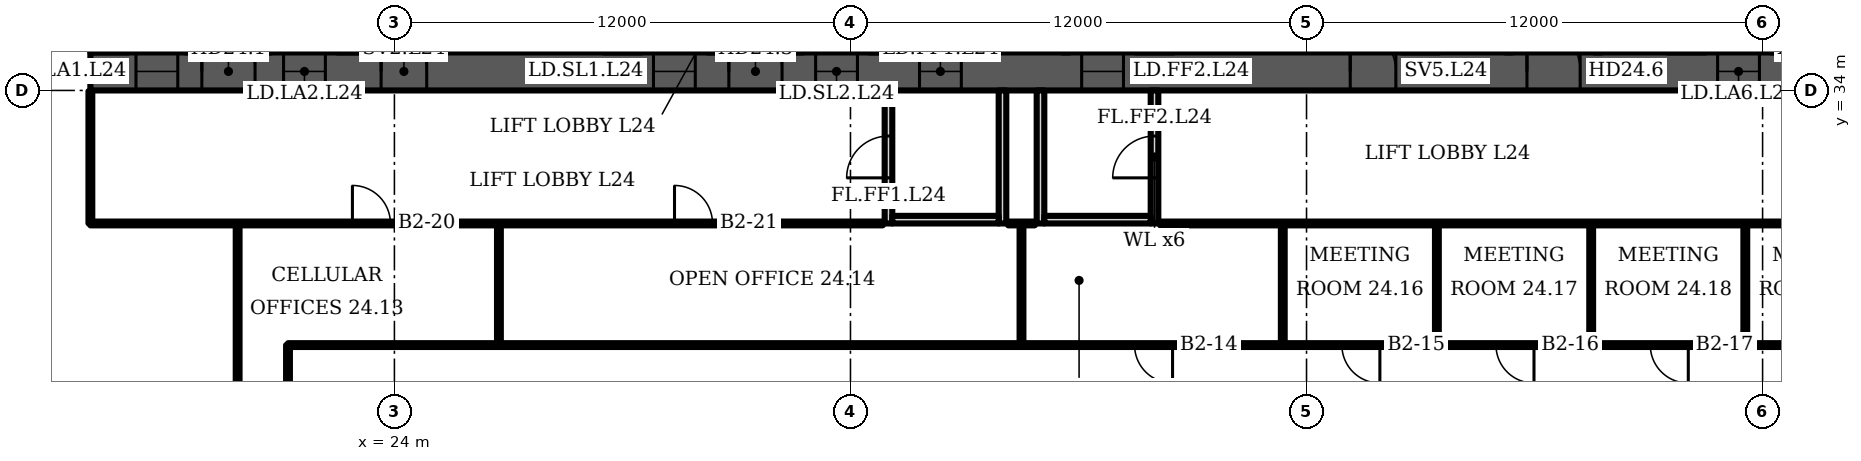
"""IFC4 building model, lengths in metres.
Left out: names, types, materials, properties, quantities, classifications, styles, units other than length and angle.
Written with IfcOpenShell. Run it as: python <this file> out.ifc"""

import sys

from ifc_helpers import new_model, si_unit, direction, frame, frame_2d, origin, place, context, subcontext, project, spatial, rectangle, extrude, element, fill, save


model = new_model("IFC4")
c1 = context("Model", 3, precision=1e-05, world=origin(), true_north=direction((0.0, 1.0)))
c2 = subcontext(c1, "Body", "Model", "MODEL_VIEW")
j1 = project(units=[si_unit("LENGTHUNIT", "METRE"), si_unit("PLANEANGLEUNIT", "RADIAN")], contexts=[c1])
p1 = place(None, origin())
s1 = spatial("IfcSite", under=j1, at=p1, CompositionType="ELEMENT")
p2 = place(p1, origin())
s2 = spatial("IfcBuilding", under=s1, at=p2, CompositionType="ELEMENT")
p3 = place(p2, frame((0.0, 0.0, 107.5)))
s3 = spatial("IfcBuildingStorey", under=s2, at=p3, CompositionType="ELEMENT", Elevation=107.5)
p4 = place(p3, frame((16.0, 34.5, 0.0), z_axis=(0.0, 0.0, 1.0), x_axis=(1.0, 0.0, 0.0)))
e1 = element("IfcWall", 1, at=p4, inside=s3, PredefinedType="SHEAR", context=c2, shape_type="SweptSolid", body=[
    extrude(rectangle(XDim=49.0, YDim=1.0, at=frame_2d((24.5, 0.0))), origin(), (0.0, 0.0, 1.0), 3.6),
])
p5 = place(p4, frame((1.2, 0.0, 0.0)))
e2 = element("IfcOpeningElement", 2, at=p5, cuts=e1, PredefinedType="OPENING", context=c2, shape_type="SweptSolid", body=[
    extrude(rectangle(XDim=1.1, YDim=2.1, at=frame_2d((0.55, 1.05))), frame((0.0, 0.51, 0.0), z_axis=(0.0, -1.0, 0.0), x_axis=(1.0, 0.0, 0.0)), (0.0, 0.0, 1.0), 1.02),
])
p6 = place(p4, frame((5.083, 0.0, 0.0)))
e3 = element("IfcOpeningElement", 3, at=p6, cuts=e1, PredefinedType="OPENING", context=c2, shape_type="SweptSolid", body=[
    extrude(rectangle(XDim=1.1, YDim=2.1, at=frame_2d((0.55, 1.05))), frame((0.0, 0.51, 0.0), z_axis=(0.0, -1.0, 0.0), x_axis=(1.0, 0.0, 0.0)), (0.0, 0.0, 1.0), 1.02),
])
p7 = place(p4, frame((2.933, 0.0, 0.0)))
e4 = element("IfcOpeningElement", 4, at=p7, cuts=e1, PredefinedType="OPENING", context=c2, shape_type="SweptSolid", body=[
    extrude(rectangle(XDim=1.4, YDim=2.1, at=frame_2d((0.7, 1.05))), frame((0.0, 0.51, 0.0), z_axis=(0.0, -1.0, 0.0), x_axis=(1.0, 0.0, 0.0)), (0.0, 0.0, 1.0), 1.02),
])
p8 = place(p4, frame((7.65, 0.0, 0.0)))
e5 = element("IfcOpeningElement", 5, at=p8, cuts=e1, PredefinedType="OPENING", context=c2, shape_type="SweptSolid", body=[
    extrude(rectangle(XDim=1.2, YDim=2.1, at=frame_2d((0.6, 1.05))), frame((0.0, 0.51, 0.0), z_axis=(0.0, -1.0, 0.0), x_axis=(1.0, 0.0, 0.0)), (0.0, 0.0, 1.0), 1.02),
])
p9 = place(p4, frame((14.817, 0.0, 0.0)))
e6 = element("IfcOpeningElement", 6, at=p9, cuts=e1, PredefinedType="OPENING", context=c2, shape_type="SweptSolid", body=[
    extrude(rectangle(XDim=1.1, YDim=2.1, at=frame_2d((0.55, 1.05))), frame((0.0, 0.51, 0.0), z_axis=(0.0, -1.0, 0.0), x_axis=(1.0, 0.0, 0.0)), (0.0, 0.0, 1.0), 1.02),
])
p10 = place(p4, frame((19.083, 0.0, 0.0)))
e7 = element("IfcOpeningElement", 7, at=p10, cuts=e1, PredefinedType="OPENING", context=c2, shape_type="SweptSolid", body=[
    extrude(rectangle(XDim=1.1, YDim=2.1, at=frame_2d((0.55, 1.05))), frame((0.0, 0.51, 0.0), z_axis=(0.0, -1.0, 0.0), x_axis=(1.0, 0.0, 0.0)), (0.0, 0.0, 1.0), 1.02),
])
p11 = place(p4, frame((16.8, 0.0, 0.0)))
e8 = element("IfcOpeningElement", 8, at=p11, cuts=e1, PredefinedType="OPENING", context=c2, shape_type="SweptSolid", body=[
    extrude(rectangle(XDim=1.4, YDim=2.1, at=frame_2d((0.7, 1.05))), frame((0.0, 0.51, 0.0), z_axis=(0.0, -1.0, 0.0), x_axis=(1.0, 0.0, 0.0)), (0.0, 0.0, 1.0), 1.02),
])
p12 = place(p4, frame((21.817, 0.0, 0.0)))
e9 = element("IfcOpeningElement", 9, at=p12, cuts=e1, PredefinedType="OPENING", context=c2, shape_type="SweptSolid", body=[
    extrude(rectangle(XDim=1.1, YDim=2.1, at=frame_2d((0.55, 1.05))), frame((0.0, 0.51, 0.0), z_axis=(0.0, -1.0, 0.0), x_axis=(1.0, 0.0, 0.0)), (0.0, 0.0, 1.0), 1.02),
])
p13 = place(p4, frame((26.083, 0.0, 0.0)))
e10 = element("IfcOpeningElement", 10, at=p13, cuts=e1, PredefinedType="OPENING", context=c2, shape_type="SweptSolid", body=[
    extrude(rectangle(XDim=1.1, YDim=2.1, at=frame_2d((0.55, 1.05))), frame((0.0, 0.51, 0.0), z_axis=(0.0, -1.0, 0.0), x_axis=(1.0, 0.0, 0.0)), (0.0, 0.0, 1.0), 1.02),
])
p14 = place(p4, frame((33.15, 0.0, 0.0)))
e11 = element("IfcOpeningElement", 11, at=p14, cuts=e1, PredefinedType="OPENING", context=c2, shape_type="SweptSolid", body=[
    extrude(rectangle(XDim=1.2, YDim=2.1, at=frame_2d((0.6, 1.05))), frame((0.0, 0.51, 0.0), z_axis=(0.0, -1.0, 0.0), x_axis=(1.0, 0.0, 0.0)), (0.0, 0.0, 1.0), 1.02),
])
p15 = place(p4, frame((37.8, 0.0, 0.0)))
e12 = element("IfcOpeningElement", 12, at=p15, cuts=e1, PredefinedType="OPENING", context=c2, shape_type="SweptSolid", body=[
    extrude(rectangle(XDim=1.4, YDim=2.1, at=frame_2d((0.7, 1.05))), frame((0.0, 0.51, 0.0), z_axis=(0.0, -1.0, 0.0), x_axis=(1.0, 0.0, 0.0)), (0.0, 0.0, 1.0), 1.02),
])
p16 = place(p4, frame((42.817, 0.0, 0.0)))
e13 = element("IfcOpeningElement", 13, at=p16, cuts=e1, PredefinedType="OPENING", context=c2, shape_type="SweptSolid", body=[
    extrude(rectangle(XDim=1.1, YDim=2.1, at=frame_2d((0.55, 1.05))), frame((0.0, 0.51, 0.0), z_axis=(0.0, -1.0, 0.0), x_axis=(1.0, 0.0, 0.0)), (0.0, 0.0, 1.0), 1.02),
])
p17 = place(p4, frame((46.7, 0.0, 0.0)))
e14 = element("IfcOpeningElement", 14, at=p17, cuts=e1, PredefinedType="OPENING", context=c2, shape_type="SweptSolid", body=[
    extrude(rectangle(XDim=1.1, YDim=2.1, at=frame_2d((0.55, 1.05))), frame((0.0, 0.51, 0.0), z_axis=(0.0, -1.0, 0.0), x_axis=(1.0, 0.0, 0.0)), (0.0, 0.0, 1.0), 1.02),
])
p18 = place(p4, frame((44.667, 0.0, 0.0)))
e15 = element("IfcOpeningElement", 15, at=p18, cuts=e1, PredefinedType="OPENING", context=c2, shape_type="SweptSolid", body=[
    extrude(rectangle(XDim=1.4, YDim=2.1, at=frame_2d((0.7, 1.05))), frame((0.0, 0.51, 0.0), z_axis=(0.0, -1.0, 0.0), x_axis=(1.0, 0.0, 0.0)), (0.0, 0.0, 1.0), 1.02),
])
p19 = place(p3, frame((37.0, 30.5, 0.0), z_axis=(0.0, 0.0, 1.0), x_axis=(0.0, 1.0, 0.0)))
e16 = element("IfcWall", 16, at=p19, inside=s3, PredefinedType="PARTITIONING", context=c2, shape_type="SweptSolid", body=[
    extrude(rectangle(XDim=3.5, YDim=0.2, at=frame_2d((1.75, 0.0))), origin(), (0.0, 0.0, 1.0), 3.2),
])
p20 = place(p19, frame((1.2, 0.0, 0.0)))
e17 = element("IfcOpeningElement", 17, at=p20, cuts=e16, PredefinedType="OPENING", context=c2, shape_type="SweptSolid", body=[
    extrude(rectangle(XDim=1.1, YDim=2.1, at=frame_2d((0.55, 1.05))), frame((0.0, 0.11, 0.0), z_axis=(0.0, -1.0, 0.0), x_axis=(1.0, 0.0, 0.0)), (0.0, 0.0, 1.0), 0.22),
])
p21 = place(p3, frame((40.0, 30.5, 0.0), z_axis=(0.0, 0.0, 1.0), x_axis=(0.0, 1.0, 0.0)))
e18 = element("IfcWall", 18, at=p21, inside=s3, PredefinedType="PARTITIONING", context=c2, shape_type="SweptSolid", body=[
    extrude(rectangle(XDim=3.5, YDim=0.2, at=frame_2d((1.75, 0.0))), origin(), (0.0, 0.0, 1.0), 3.2),
])
p22 = place(p3, frame((37.1, 30.6, 0.0), z_axis=(0.0, 0.0, 1.0), x_axis=(1.0, 0.0, 0.0)))
e19 = element("IfcWall", 19, at=p22, inside=s3, PredefinedType="PARTITIONING", context=c2, shape_type="SweptSolid", body=[
    extrude(rectangle(XDim=2.8, YDim=0.2, at=frame_2d((1.4, 0.0))), origin(), (0.0, 0.0, 1.0), 3.2),
])
p23 = place(p3, frame((41.0, 30.5, 0.0), z_axis=(0.0, 0.0, 1.0), x_axis=(0.0, 1.0, 0.0)))
e20 = element("IfcWall", 20, at=p23, inside=s3, PredefinedType="PARTITIONING", context=c2, shape_type="SweptSolid", body=[
    extrude(rectangle(XDim=3.5, YDim=0.2, at=frame_2d((1.75, 0.0))), origin(), (0.0, 0.0, 1.0), 3.2),
])
p24 = place(p3, frame((44.0, 30.5, 0.0), z_axis=(0.0, 0.0, 1.0), x_axis=(0.0, 1.0, 0.0)))
e21 = element("IfcWall", 21, at=p24, inside=s3, PredefinedType="PARTITIONING", context=c2, shape_type="SweptSolid", body=[
    extrude(rectangle(XDim=3.5, YDim=0.2, at=frame_2d((1.75, 0.0))), origin(), (0.0, 0.0, 1.0), 3.2),
])
p25 = place(p24, frame((1.2, 0.0, 0.0)))
e22 = element("IfcOpeningElement", 22, at=p25, cuts=e21, PredefinedType="OPENING", context=c2, shape_type="SweptSolid", body=[
    extrude(rectangle(XDim=1.1, YDim=2.1, at=frame_2d((0.55, 1.05))), frame((0.0, 0.11, 0.0), z_axis=(0.0, -1.0, 0.0), x_axis=(1.0, 0.0, 0.0)), (0.0, 0.0, 1.0), 0.22),
])
p26 = place(p3, frame((41.1, 30.6, 0.0), z_axis=(0.0, 0.0, 1.0), x_axis=(1.0, 0.0, 0.0)))
e23 = element("IfcWall", 23, at=p26, inside=s3, PredefinedType="PARTITIONING", context=c2, shape_type="SweptSolid", body=[
    extrude(rectangle(XDim=2.8, YDim=0.2, at=frame_2d((1.4, 0.0))), origin(), (0.0, 0.0, 1.0), 3.2),
])
p27 = place(p3, frame((16.0, 30.5, 0.0), z_axis=(0.0, 0.0, 1.0), x_axis=(0.0, 1.0, 0.0)))
e24 = element("IfcWall", 24, at=p27, inside=s3, PredefinedType="PARTITIONING", context=c2, shape_type="SweptSolid", body=[
    extrude(rectangle(XDim=3.48, YDim=0.1, at=frame_2d((1.74, 0.0))), origin(), (0.0, 0.0, 1.0), 3.2),
])
p28 = place(p3, frame((16.0, 30.5, 0.0), z_axis=(0.0, 0.0, 1.0), x_axis=(1.0, 0.0, 0.0)))
e25 = element("IfcWall", 25, at=p28, inside=s3, PredefinedType="PARTITIONING", context=c2, shape_type="SweptSolid", body=[
    extrude(rectangle(XDim=20.85, YDim=0.1, at=frame_2d((10.425, 0.0))), origin(), (0.0, 0.0, 1.0), 3.2),
])
p29 = place(p28, frame((6.895, 0.0, 0.0)))
e26 = element("IfcOpeningElement", 26, at=p29, cuts=e25, PredefinedType="OPENING", context=c2, shape_type="SweptSolid", body=[
    extrude(rectangle(XDim=1.0, YDim=2.1, at=frame_2d((0.5, 1.05))), frame((0.0, 0.06, 0.0), z_axis=(0.0, -1.0, 0.0), x_axis=(1.0, 0.0, 0.0)), (0.0, 0.0, 1.0), 0.12),
])
p30 = place(p28, frame((15.37, 0.0, 0.0)))
e27 = element("IfcOpeningElement", 27, at=p30, cuts=e25, PredefinedType="OPENING", context=c2, shape_type="SweptSolid", body=[
    extrude(rectangle(XDim=1.0, YDim=2.1, at=frame_2d((0.5, 1.05))), frame((0.0, 0.06, 0.0), z_axis=(0.0, -1.0, 0.0), x_axis=(1.0, 0.0, 0.0)), (0.0, 0.0, 1.0), 0.12),
])
p31 = place(p3, frame((19.875, 23.6, 0.0), z_axis=(0.0, 0.0, 1.0), x_axis=(0.0, 1.0, 0.0)))
e28 = element("IfcWall", 28, at=p31, inside=s3, PredefinedType="PARTITIONING", context=c2, shape_type="SweptSolid", body=[
    extrude(rectangle(XDim=6.9, YDim=0.1, at=frame_2d((3.45, 0.0))), origin(), (0.0, 0.0, 1.0), 3.2),
])
p32 = place(p3, frame((21.2, 23.6, 0.0), z_axis=(0.0, 0.0, 1.0), x_axis=(0.0, 1.0, 0.0)))
e29 = element("IfcWall", 29, at=p32, inside=s3, PredefinedType="PARTITIONING", context=c2, shape_type="SweptSolid", body=[
    extrude(rectangle(XDim=3.7, YDim=0.1, at=frame_2d((1.85, 0.0))), origin(), (0.0, 0.0, 1.0), 3.2),
])
p33 = place(p3, frame((21.2, 27.3, 0.0), z_axis=(0.0, 0.0, 1.0), x_axis=(1.0, 0.0, 0.0)))
e30 = element("IfcWall", 30, at=p33, inside=s3, PredefinedType="PARTITIONING", context=c2, shape_type="SweptSolid", body=[
    extrude(rectangle(XDim=42.4, YDim=0.1, at=frame_2d((21.2, 0.0))), origin(), (0.0, 0.0, 1.0), 3.2),
])
p34 = place(p33, frame((22.275, 0.0, 0.0)))
e31 = element("IfcOpeningElement", 31, at=p34, cuts=e30, PredefinedType="OPENING", context=c2, shape_type="SweptSolid", body=[
    extrude(rectangle(XDim=1.0, YDim=2.1, at=frame_2d((0.5, 1.05))), frame((0.0, 0.06, 0.0), z_axis=(0.0, -1.0, 0.0), x_axis=(1.0, 0.0, 0.0)), (0.0, 0.0, 1.0), 0.12),
])
p35 = place(p33, frame((27.73, 0.0, 0.0)))
e32 = element("IfcOpeningElement", 32, at=p35, cuts=e30, PredefinedType="OPENING", context=c2, shape_type="SweptSolid", body=[
    extrude(rectangle(XDim=1.0, YDim=2.1, at=frame_2d((0.5, 1.05))), frame((0.0, 0.06, 0.0), z_axis=(0.0, -1.0, 0.0), x_axis=(1.0, 0.0, 0.0)), (0.0, 0.0, 1.0), 0.12),
])
p36 = place(p33, frame((31.785, 0.0, 0.0)))
e33 = element("IfcOpeningElement", 33, at=p36, cuts=e30, PredefinedType="OPENING", context=c2, shape_type="SweptSolid", body=[
    extrude(rectangle(XDim=1.0, YDim=2.1, at=frame_2d((0.5, 1.05))), frame((0.0, 0.06, 0.0), z_axis=(0.0, -1.0, 0.0), x_axis=(1.0, 0.0, 0.0)), (0.0, 0.0, 1.0), 0.12),
])
p37 = place(p33, frame((35.845, 0.0, 0.0)))
e34 = element("IfcOpeningElement", 34, at=p37, cuts=e30, PredefinedType="OPENING", context=c2, shape_type="SweptSolid", body=[
    extrude(rectangle(XDim=1.0, YDim=2.1, at=frame_2d((0.5, 1.05))), frame((0.0, 0.06, 0.0), z_axis=(0.0, -1.0, 0.0), x_axis=(1.0, 0.0, 0.0)), (0.0, 0.0, 1.0), 0.12),
])
p38 = place(p33, frame((39.9, 0.0, 0.0)))
e35 = element("IfcOpeningElement", 35, at=p38, cuts=e30, PredefinedType="OPENING", context=c2, shape_type="SweptSolid", body=[
    extrude(rectangle(XDim=1.0, YDim=2.1, at=frame_2d((0.5, 1.05))), frame((0.0, 0.06, 0.0), z_axis=(0.0, -1.0, 0.0), x_axis=(1.0, 0.0, 0.0)), (0.0, 0.0, 1.0), 0.12),
])
for number, where, z_axis, x_axis in (
    (36, (26.75, 27.3, 0.0), (0.0, 0.0, 1.0), (0.0, 1.0, 0.0)),
    (37, (40.5, 27.3, 0.0), (0.0, 0.0, 1.0), (0.0, 1.0, 0.0)),
    (38, (47.375, 27.3, 0.0), (0.0, 0.0, 1.0), (0.0, 1.0, 0.0)),
    (39, (51.43, 27.3, 0.0), (0.0, 0.0, 1.0), (0.0, 1.0, 0.0)),
    (40, (55.49, 27.3, 0.0), (0.0, 0.0, 1.0), (0.0, 1.0, 0.0)),
    (41, (59.545, 27.3, 0.0), (0.0, 0.0, 1.0), (0.0, 1.0, 0.0)),
):
    element("IfcWall", number, at=place(p3, frame(where, z_axis=z_axis, x_axis=x_axis)), inside=s3, PredefinedType="PARTITIONING", context=c2, shape_type="SweptSolid", body=[
        extrude(rectangle(XDim=3.2, YDim=0.1, at=frame_2d((1.6, 0.0))), origin(), (0.0, 0.0, 1.0), 3.2),
    ])
p39 = place(p3, frame((40.15, 30.5, 0.0), z_axis=(0.0, 0.0, 1.0), x_axis=(1.0, 0.0, 0.0)))
e42 = element("IfcWall", 42, at=p39, inside=s3, PredefinedType="PARTITIONING", context=c2, shape_type="SweptSolid", body=[
    extrude(rectangle(XDim=0.7, YDim=0.1, at=frame_2d((0.35, 0.0))), origin(), (0.0, 0.0, 1.0), 3.2),
])
p40 = place(p3, frame((44.15, 30.5, 0.0), z_axis=(0.0, 0.0, 1.0), x_axis=(1.0, 0.0, 0.0)))
e43 = element("IfcWall", 43, at=p40, inside=s3, PredefinedType="PARTITIONING", context=c2, shape_type="SweptSolid", body=[
    extrude(rectangle(XDim=19.45, YDim=0.1, at=frame_2d((9.725, 0.0))), origin(), (0.0, 0.0, 1.0), 3.2),
])
p41 = place(p5, origin())
e44 = element("IfcDoor", 44, at=p41, inside=s3, OperationType="DOUBLE_DOOR_SLIDING", PredefinedType="DOOR", context=c2, shape_type="SweptSolid", body=[
    extrude(rectangle(XDim=1.1, YDim=2.1, at=frame_2d((0.55, 1.05))), frame((0.0, 0.025, 0.0), z_axis=(0.0, -1.0, 0.0), x_axis=(1.0, 0.0, 0.0)), (0.0, 0.0, 1.0), 0.05),
])
fill(e2, e44)
p42 = place(p6, origin())
e45 = element("IfcDoor", 45, at=p42, inside=s3, OperationType="DOUBLE_DOOR_SLIDING", PredefinedType="DOOR", context=c2, shape_type="SweptSolid", body=[
    extrude(rectangle(XDim=1.1, YDim=2.1, at=frame_2d((0.55, 1.05))), frame((0.0, 0.025, 0.0), z_axis=(0.0, -1.0, 0.0), x_axis=(1.0, 0.0, 0.0)), (0.0, 0.0, 1.0), 0.05),
])
fill(e3, e45)
p43 = place(p7, origin())
e46 = element("IfcDoor", 46, at=p43, inside=s3, OperationType="DOUBLE_DOOR_SINGLE_SWING", PredefinedType="DOOR", context=c2, shape_type="SweptSolid", body=[
    extrude(rectangle(XDim=1.4, YDim=2.1, at=frame_2d((0.7, 1.05))), frame((0.0, 0.025, 0.0), z_axis=(0.0, -1.0, 0.0), x_axis=(1.0, 0.0, 0.0)), (0.0, 0.0, 1.0), 0.05),
])
fill(e4, e46)
p44 = place(p8, origin())
e47 = element("IfcDoor", 47, at=p44, inside=s3, OperationType="SINGLE_SWING_LEFT", PredefinedType="DOOR", context=c2, shape_type="SweptSolid", body=[
    extrude(rectangle(XDim=1.2, YDim=2.1, at=frame_2d((0.6, 1.05))), frame((0.0, 0.025, 0.0), z_axis=(0.0, -1.0, 0.0), x_axis=(1.0, 0.0, 0.0)), (0.0, 0.0, 1.0), 0.05),
])
fill(e5, e47)
p45 = place(p9, origin())
e48 = element("IfcDoor", 48, at=p45, inside=s3, OperationType="DOUBLE_DOOR_SLIDING", PredefinedType="DOOR", context=c2, shape_type="SweptSolid", body=[
    extrude(rectangle(XDim=1.1, YDim=2.1, at=frame_2d((0.55, 1.05))), frame((0.0, 0.025, 0.0), z_axis=(0.0, -1.0, 0.0), x_axis=(1.0, 0.0, 0.0)), (0.0, 0.0, 1.0), 0.05),
])
fill(e6, e48)
p46 = place(p10, origin())
e49 = element("IfcDoor", 49, at=p46, inside=s3, OperationType="DOUBLE_DOOR_SLIDING", PredefinedType="DOOR", context=c2, shape_type="SweptSolid", body=[
    extrude(rectangle(XDim=1.1, YDim=2.1, at=frame_2d((0.55, 1.05))), frame((0.0, 0.025, 0.0), z_axis=(0.0, -1.0, 0.0), x_axis=(1.0, 0.0, 0.0)), (0.0, 0.0, 1.0), 0.05),
])
fill(e7, e49)
p47 = place(p11, origin())
e50 = element("IfcDoor", 50, at=p47, inside=s3, OperationType="DOUBLE_DOOR_SINGLE_SWING", PredefinedType="DOOR", context=c2, shape_type="SweptSolid", body=[
    extrude(rectangle(XDim=1.4, YDim=2.1, at=frame_2d((0.7, 1.05))), frame((0.0, 0.025, 0.0), z_axis=(0.0, -1.0, 0.0), x_axis=(1.0, 0.0, 0.0)), (0.0, 0.0, 1.0), 0.05),
])
fill(e8, e50)
p48 = place(p12, origin())
e51 = element("IfcDoor", 51, at=p48, inside=s3, OperationType="DOUBLE_DOOR_SLIDING", PredefinedType="DOOR", context=c2, shape_type="SweptSolid", body=[
    extrude(rectangle(XDim=1.1, YDim=2.1, at=frame_2d((0.55, 1.05))), frame((0.0, 0.025, 0.0), z_axis=(0.0, -1.0, 0.0), x_axis=(1.0, 0.0, 0.0)), (0.0, 0.0, 1.0), 0.05),
])
fill(e9, e51)
p49 = place(p13, origin())
e52 = element("IfcDoor", 52, at=p49, inside=s3, OperationType="DOUBLE_DOOR_SLIDING", PredefinedType="DOOR", context=c2, shape_type="SweptSolid", body=[
    extrude(rectangle(XDim=1.1, YDim=2.1, at=frame_2d((0.55, 1.05))), frame((0.0, 0.025, 0.0), z_axis=(0.0, -1.0, 0.0), x_axis=(1.0, 0.0, 0.0)), (0.0, 0.0, 1.0), 0.05),
])
fill(e10, e52)
p50 = place(p14, origin())
e53 = element("IfcDoor", 53, at=p50, inside=s3, OperationType="SINGLE_SWING_LEFT", PredefinedType="DOOR", context=c2, shape_type="SweptSolid", body=[
    extrude(rectangle(XDim=1.2, YDim=2.1, at=frame_2d((0.6, 1.05))), frame((0.0, 0.025, 0.0), z_axis=(0.0, -1.0, 0.0), x_axis=(1.0, 0.0, 0.0)), (0.0, 0.0, 1.0), 0.05),
])
fill(e11, e53)
p51 = place(p15, origin())
e54 = element("IfcDoor", 54, at=p51, inside=s3, OperationType="DOUBLE_DOOR_SINGLE_SWING", PredefinedType="DOOR", context=c2, shape_type="SweptSolid", body=[
    extrude(rectangle(XDim=1.4, YDim=2.1, at=frame_2d((0.7, 1.05))), frame((0.0, 0.025, 0.0), z_axis=(0.0, -1.0, 0.0), x_axis=(1.0, 0.0, 0.0)), (0.0, 0.0, 1.0), 0.05),
])
fill(e12, e54)
p52 = place(p16, origin())
e55 = element("IfcDoor", 55, at=p52, inside=s3, OperationType="DOUBLE_DOOR_SLIDING", PredefinedType="DOOR", context=c2, shape_type="SweptSolid", body=[
    extrude(rectangle(XDim=1.1, YDim=2.1, at=frame_2d((0.55, 1.05))), frame((0.0, 0.025, 0.0), z_axis=(0.0, -1.0, 0.0), x_axis=(1.0, 0.0, 0.0)), (0.0, 0.0, 1.0), 0.05),
])
fill(e13, e55)
p53 = place(p20, origin())
e56 = element("IfcDoor", 56, at=p53, inside=s3, OperationType="SINGLE_SWING_LEFT", PredefinedType="DOOR", context=c2, shape_type="SweptSolid", body=[
    extrude(rectangle(XDim=1.1, YDim=2.1, at=frame_2d((0.55, 1.05))), frame((0.0, 0.025, 0.0), z_axis=(0.0, -1.0, 0.0), x_axis=(1.0, 0.0, 0.0)), (0.0, 0.0, 1.0), 0.05),
])
fill(e17, e56)
p54 = place(p25, origin())
e57 = element("IfcDoor", 57, at=p54, inside=s3, OperationType="SINGLE_SWING_LEFT", PredefinedType="DOOR", context=c2, shape_type="SweptSolid", body=[
    extrude(rectangle(XDim=1.1, YDim=2.1, at=frame_2d((0.55, 1.05))), frame((0.0, 0.025, 0.0), z_axis=(0.0, -1.0, 0.0), x_axis=(1.0, 0.0, 0.0)), (0.0, 0.0, 1.0), 0.05),
])
fill(e22, e57)
p55 = place(p34, origin())
e58 = element("IfcDoor", 58, at=p55, inside=s3, OperationType="SINGLE_SWING_RIGHT", PredefinedType="DOOR", context=c2, shape_type="SweptSolid", body=[
    extrude(rectangle(XDim=1.0, YDim=2.1, at=frame_2d((0.5, 1.05))), frame((0.0, 0.025, 0.0), z_axis=(0.0, -1.0, 0.0), x_axis=(1.0, 0.0, 0.0)), (0.0, 0.0, 1.0), 0.05),
])
fill(e31, e58)
p56 = place(p35, origin())
e59 = element("IfcDoor", 59, at=p56, inside=s3, OperationType="SINGLE_SWING_RIGHT", PredefinedType="DOOR", context=c2, shape_type="SweptSolid", body=[
    extrude(rectangle(XDim=1.0, YDim=2.1, at=frame_2d((0.5, 1.05))), frame((0.0, 0.025, 0.0), z_axis=(0.0, -1.0, 0.0), x_axis=(1.0, 0.0, 0.0)), (0.0, 0.0, 1.0), 0.05),
])
fill(e32, e59)
p57 = place(p36, origin())
e60 = element("IfcDoor", 60, at=p57, inside=s3, OperationType="SINGLE_SWING_RIGHT", PredefinedType="DOOR", context=c2, shape_type="SweptSolid", body=[
    extrude(rectangle(XDim=1.0, YDim=2.1, at=frame_2d((0.5, 1.05))), frame((0.0, 0.025, 0.0), z_axis=(0.0, -1.0, 0.0), x_axis=(1.0, 0.0, 0.0)), (0.0, 0.0, 1.0), 0.05),
])
fill(e33, e60)
p58 = place(p37, origin())
e61 = element("IfcDoor", 61, at=p58, inside=s3, OperationType="SINGLE_SWING_RIGHT", PredefinedType="DOOR", context=c2, shape_type="SweptSolid", body=[
    extrude(rectangle(XDim=1.0, YDim=2.1, at=frame_2d((0.5, 1.05))), frame((0.0, 0.025, 0.0), z_axis=(0.0, -1.0, 0.0), x_axis=(1.0, 0.0, 0.0)), (0.0, 0.0, 1.0), 0.05),
])
fill(e34, e61)
p59 = place(p29, origin())
e62 = element("IfcDoor", 62, at=p59, inside=s3, OperationType="SINGLE_SWING_LEFT", PredefinedType="DOOR", context=c2, shape_type="SweptSolid", body=[
    extrude(rectangle(XDim=1.0, YDim=2.1, at=frame_2d((0.5, 1.05))), frame((0.0, 0.025, 0.0), z_axis=(0.0, -1.0, 0.0), x_axis=(1.0, 0.0, 0.0)), (0.0, 0.0, 1.0), 0.05),
])
fill(e26, e62)
p60 = place(p30, origin())
e63 = element("IfcDoor", 63, at=p60, inside=s3, OperationType="SINGLE_SWING_LEFT", PredefinedType="DOOR", context=c2, shape_type="SweptSolid", body=[
    extrude(rectangle(XDim=1.0, YDim=2.1, at=frame_2d((0.5, 1.05))), frame((0.0, 0.025, 0.0), z_axis=(0.0, -1.0, 0.0), x_axis=(1.0, 0.0, 0.0)), (0.0, 0.0, 1.0), 0.05),
])
fill(e27, e63)
save(model, sys.argv[1])
